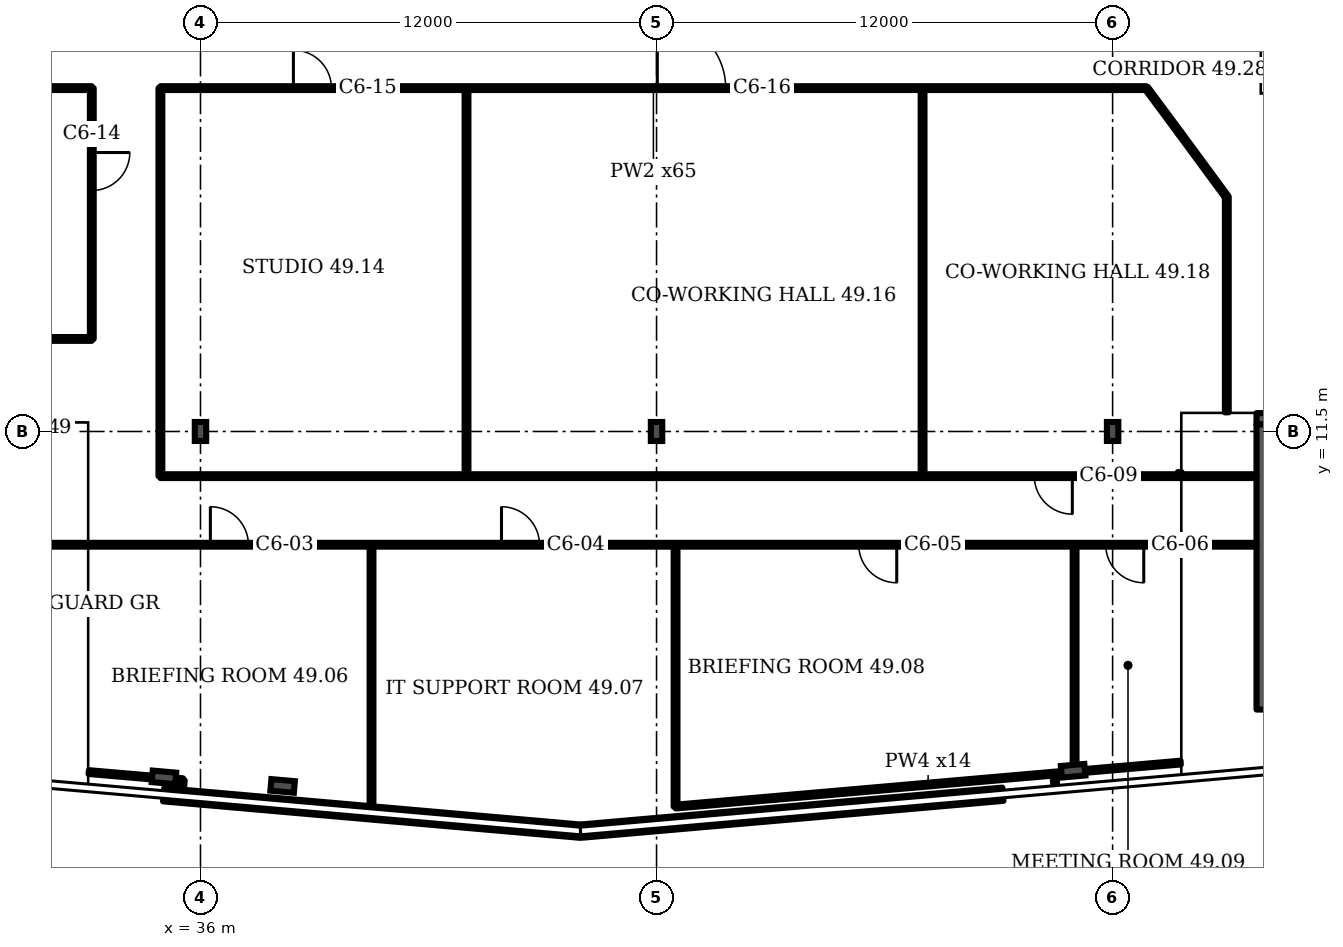
"""IFC4 building model, lengths in metres.
Left out: names, types, materials, properties, quantities, classifications, styles, units other than length and angle.
Written with IfcOpenShell. Run it as: python <this file> out.ifc"""

import sys

from ifc_helpers import new_model, si_unit, direction, frame, frame_2d, origin, origin_2d, place, context, subcontext, project, spatial, rectangle, i_section, extrude, element, fill, save


model = new_model("IFC4")
c1 = context("Model", 3, precision=1e-05, world=origin(), true_north=direction((0.0, 1.0)))
c2 = subcontext(c1, "Body", "Model", "MODEL_VIEW")
j1 = project(units=[si_unit("LENGTHUNIT", "METRE"), si_unit("PLANEANGLEUNIT", "RADIAN")], contexts=[c1])
p1 = place(None, origin())
s1 = spatial("IfcSite", under=j1, at=p1, CompositionType="ELEMENT")
p2 = place(p1, origin())
s2 = spatial("IfcBuilding", under=s1, at=p2, CompositionType="ELEMENT")
p3 = place(p2, frame((0.0, 0.0, 198.7)))
s3 = spatial("IfcBuildingStorey", under=s2, at=p3, CompositionType="ELEMENT", Elevation=198.7)
for number, where, z_axis, x_axis in (
    (1, (35.039, 2.399, 0.0), (0.0, 0.0, 1.0), (-0.087, -0.996, 0.0)),
    (2, (38.161, 2.174, 0.0), (0.0, 0.0, 1.0), (-0.087, -0.996, 0.0)),
    (3, (58.961, 2.573, 0.0), (0.0, 0.0, 1.0), (0.087, -0.996, 0.0)),
):
    element("IfcColumn", number, at=place(p3, frame(where, z_axis=z_axis, x_axis=x_axis)), inside=s3, PredefinedType="COLUMN", context=c2, shape_type="SweptSolid", body=[
        extrude(i_section(OverallWidth=0.305, OverallDepth=0.62, WebThickness=0.021, FlangeThickness=0.04, FilletRadius=0.027, at=origin_2d()), origin(), (0.0, 0.0, 1.0), 3.6),
    ])
for number, where, z_axis, x_axis in (
    (4, (36.0, 11.5, 0.0), (0.0, 0.0, 1.0), (1.0, 0.0, 0.0)),
    (5, (48.0, 11.5, 0.0), (0.0, 0.0, 1.0), (1.0, 0.0, 0.0)),
    (6, (60.0, 11.5, 0.0), (0.0, 0.0, 1.0), (1.0, 0.0, 0.0)),
):
    element("IfcColumn", number, at=place(p3, frame(where, z_axis=z_axis, x_axis=x_axis)), inside=s3, PredefinedType="COLUMN", context=c2, shape_type="SweptSolid", body=[
        extrude(i_section(OverallWidth=0.3, OverallDepth=0.5, WebThickness=0.014, FlangeThickness=0.028, FilletRadius=0.027, at=origin_2d()), origin(), (0.0, 0.0, 1.0), 3.6),
    ])
p4 = place(p3, frame((35.03, 1.943, 0.0), z_axis=(0.0, 0.0, 1.0), x_axis=(0.996199, -0.08714, 0.0)))
e7 = element("IfcWall", 7, at=p4, inside=s3, PredefinedType="SOLIDWALL", context=c2, shape_type="SweptSolid", body=[
    extrude(rectangle(XDim=11.028, YDim=0.35, at=frame_2d((5.514, 0.0))), origin(), (0.0, 0.0, 1.0), 1.0),
])
p5 = place(p3, frame((46.045, 0.987, 0.0), z_axis=(0.0, 0.0, 1.0), x_axis=(0.996193, 0.087171, 0.0)))
e8 = element("IfcWall", 8, at=p5, inside=s3, PredefinedType="SOLIDWALL", context=c2, shape_type="SweptSolid", body=[
    extrude(rectangle(XDim=11.11, YDim=0.35, at=frame_2d((5.555, 0.0))), origin(), (0.0, 0.0, 1.0), 1.0),
])
p6 = place(p3, frame((63.786, 11.834, 0.0), z_axis=(0.0, 0.0, 1.0), x_axis=(1.0, 0.0, 0.0)))
e9 = element("IfcWall", 9, at=p6, inside=s3, PredefinedType="SHEAR", context=c2, shape_type="SweptSolid", body=[
    extrude(rectangle(XDim=4.35, YDim=0.3, at=frame_2d((2.175, 0.0))), origin(), (0.0, 0.0, 1.0), 3.15),
])
p7 = place(p6, frame((1.575, 0.0, 0.0)))
e10 = element("IfcOpeningElement", 10, at=p7, cuts=e9, PredefinedType="OPENING", context=c2, shape_type="SweptSolid", body=[
    extrude(rectangle(XDim=1.2, YDim=2.1, at=frame_2d((0.6, 1.05))), frame((0.0, 0.16, 0.0), z_axis=(0.0, -1.0, 0.0), x_axis=(1.0, 0.0, 0.0)), (0.0, 0.0, 1.0), 0.32),
])
p8 = place(p3, frame((18.585, 20.535, 0.0), z_axis=(0.0, 0.0, 1.0), x_axis=(1.0, 0.0, 0.0)))
e11 = element("IfcWall", 11, at=p8, inside=s3, PredefinedType="PARTITIONING", context=c2, shape_type="SweptSolid", body=[
    extrude(rectangle(XDim=14.555, YDim=0.1, at=frame_2d((7.277, 0.0))), origin(), (0.0, 0.0, 1.0), 3.15),
])
p9 = place(p3, frame((30.69, 13.935, 0.0), z_axis=(0.0, 0.0, 1.0), x_axis=(1.0, 0.0, 0.0)))
e12 = element("IfcWall", 12, at=p9, inside=s3, PredefinedType="PARTITIONING", context=c2, shape_type="SweptSolid", body=[
    extrude(rectangle(XDim=2.45, YDim=0.1, at=frame_2d((1.225, 0.0))), origin(), (0.0, 0.0, 1.0), 3.15),
])
p10 = place(p3, frame((31.714, 8.52, 0.0), z_axis=(0.0, 0.0, 1.0), x_axis=(1.0, 0.0, 0.0)))
e13 = element("IfcWall", 13, at=p10, inside=s3, PredefinedType="PARTITIONING", context=c2, shape_type="SweptSolid", body=[
    extrude(rectangle(XDim=32.072, YDim=0.1, at=frame_2d((16.036, 0.0))), origin(), (0.0, 0.0, 1.0), 3.15),
])
p11 = place(p10, frame((4.546, 0.0, 0.0)))
e14 = element("IfcOpeningElement", 14, at=p11, cuts=e13, PredefinedType="OPENING", context=c2, shape_type="SweptSolid", body=[
    extrude(rectangle(XDim=1.0, YDim=2.1, at=frame_2d((0.5, 1.05))), frame((0.0, 0.06, 0.0), z_axis=(0.0, -1.0, 0.0), x_axis=(1.0, 0.0, 0.0)), (0.0, 0.0, 1.0), 0.12),
])
p12 = place(p10, frame((12.206, 0.0, 0.0)))
e15 = element("IfcOpeningElement", 15, at=p12, cuts=e13, PredefinedType="OPENING", context=c2, shape_type="SweptSolid", body=[
    extrude(rectangle(XDim=1.0, YDim=2.1, at=frame_2d((0.5, 1.05))), frame((0.0, 0.06, 0.0), z_axis=(0.0, -1.0, 0.0), x_axis=(1.0, 0.0, 0.0)), (0.0, 0.0, 1.0), 0.12),
])
p13 = place(p10, frame((21.606, 0.0, 0.0)))
e16 = element("IfcOpeningElement", 16, at=p13, cuts=e13, PredefinedType="OPENING", context=c2, shape_type="SweptSolid", body=[
    extrude(rectangle(XDim=1.0, YDim=2.1, at=frame_2d((0.5, 1.05))), frame((0.0, 0.06, 0.0), z_axis=(0.0, -1.0, 0.0), x_axis=(1.0, 0.0, 0.0)), (0.0, 0.0, 1.0), 0.12),
])
p14 = place(p10, frame((28.106, 0.0, 0.0)))
e17 = element("IfcOpeningElement", 17, at=p14, cuts=e13, PredefinedType="OPENING", context=c2, shape_type="SweptSolid", body=[
    extrude(rectangle(XDim=1.0, YDim=2.1, at=frame_2d((0.5, 1.05))), frame((0.0, 0.06, 0.0), z_axis=(0.0, -1.0, 0.0), x_axis=(1.0, 0.0, 0.0)), (0.0, 0.0, 1.0), 0.12),
])
p15 = place(p3, frame((33.14, 13.935, 0.0), z_axis=(0.0, 0.0, 1.0), x_axis=(0.0, 1.0, 0.0)))
e18 = element("IfcWall", 18, at=p15, inside=s3, PredefinedType="PARTITIONING", context=c2, shape_type="SweptSolid", body=[
    extrude(rectangle(XDim=6.6, YDim=0.1, at=frame_2d((3.3, 0.0))), origin(), (0.0, 0.0, 1.0), 3.15),
])
p16 = place(p15, frame((3.905, 0.0, 0.0)))
e19 = element("IfcOpeningElement", 19, at=p16, cuts=e18, PredefinedType="OPENING", context=c2, shape_type="SweptSolid", body=[
    extrude(rectangle(XDim=1.0, YDim=2.1, at=frame_2d((0.5, 1.05))), frame((0.0, 0.06, 0.0), z_axis=(0.0, -1.0, 0.0), x_axis=(1.0, 0.0, 0.0)), (0.0, 0.0, 1.0), 0.12),
])
p17 = place(p3, frame((34.945, 10.325, 0.0), z_axis=(0.0, 0.0, 1.0), x_axis=(0.0, 1.0, 0.0)))
e20 = element("IfcWall", 20, at=p17, inside=s3, PredefinedType="PARTITIONING", context=c2, shape_type="SweptSolid", body=[
    extrude(rectangle(XDim=10.21, YDim=0.1, at=frame_2d((5.105, 0.0))), origin(), (0.0, 0.0, 1.0), 3.15),
])
p18 = place(p3, frame((34.945, 10.325, 0.0), z_axis=(0.0, 0.0, 1.0), x_axis=(1.0, 0.0, 0.0)))
e21 = element("IfcWall", 21, at=p18, inside=s3, PredefinedType="PARTITIONING", context=c2, shape_type="SweptSolid", body=[
    extrude(rectangle(XDim=28.841, YDim=0.1, at=frame_2d((14.421, 0.0))), origin(), (0.0, 0.0, 1.0), 3.15),
])
p19 = place(p18, frame((22.995, 0.0, 0.0)))
e22 = element("IfcOpeningElement", 22, at=p19, cuts=e21, PredefinedType="OPENING", context=c2, shape_type="SweptSolid", body=[
    extrude(rectangle(XDim=1.0, YDim=2.1, at=frame_2d((0.5, 1.05))), frame((0.0, 0.06, 0.0), z_axis=(0.0, -1.0, 0.0), x_axis=(1.0, 0.0, 0.0)), (0.0, 0.0, 1.0), 0.12),
])
p20 = place(p3, frame((34.945, 20.535, 0.0), z_axis=(0.0, 0.0, 1.0), x_axis=(1.0, 0.0, 0.0)))
e23 = element("IfcWall", 23, at=p20, inside=s3, PredefinedType="PARTITIONING", context=c2, shape_type="SweptSolid", body=[
    extrude(rectangle(XDim=25.945, YDim=0.1, at=frame_2d((12.972, 0.0))), origin(), (0.0, 0.0, 1.0), 3.15),
])
p21 = place(p20, frame((3.5, 0.0, 0.0)))
e24 = element("IfcOpeningElement", 24, at=p21, cuts=e23, PredefinedType="OPENING", context=c2, shape_type="SweptSolid", body=[
    extrude(rectangle(XDim=1.0, YDim=2.1, at=frame_2d((0.5, 1.05))), frame((0.0, 0.06, 0.0), z_axis=(0.0, -1.0, 0.0), x_axis=(1.0, 0.0, 0.0)), (0.0, 0.0, 1.0), 0.12),
])
p22 = place(p20, frame((13.075, 0.0, 0.0)))
e25 = element("IfcOpeningElement", 25, at=p22, cuts=e23, PredefinedType="OPENING", context=c2, shape_type="SweptSolid", body=[
    extrude(rectangle(XDim=1.8, YDim=2.1, at=frame_2d((0.9, 1.05))), frame((0.0, 0.06, 0.0), z_axis=(0.0, -1.0, 0.0), x_axis=(1.0, 0.0, 0.0)), (0.0, 0.0, 1.0), 0.12),
])
p23 = place(p3, frame((35.502, 1.927, 0.0), z_axis=(0.0, 0.0, 1.0), x_axis=(0.083045, 0.996542, 0.0)))
e26 = element("IfcWall", 26, at=p23, inside=s3, PredefinedType="PARTITIONING", context=c2, shape_type="SweptSolid", body=[
    extrude(rectangle(XDim=0.4, YDim=0.1, at=frame_2d((0.2, 0.0))), origin(), (0.0, 0.0, 1.0), 3.15),
])
p24 = place(p3, frame((35.535, 2.325, 0.0), z_axis=(0.0, 0.0, 1.0), x_axis=(-0.996311, 0.085867, 0.0)))
e27 = element("IfcWall", 27, at=p24, inside=s3, PredefinedType="PARTITIONING", context=c2, shape_type="SweptSolid", body=[
    extrude(rectangle(XDim=2.485, YDim=0.1, at=frame_2d((1.243, 0.0))), origin(), (0.0, 0.0, 1.0), 2.53),
])
p25 = place(p3, frame((40.5, 1.489, 0.0), z_axis=(0.0, 0.0, 1.0), x_axis=(0.0, 1.0, 0.0)))
e28 = element("IfcWall", 28, at=p25, inside=s3, PredefinedType="PARTITIONING", context=c2, shape_type="SweptSolid", body=[
    extrude(rectangle(XDim=7.031, YDim=0.1, at=frame_2d((3.515, 0.0))), origin(), (0.0, 0.0, 1.0), 3.15),
])
p26 = place(p3, frame((43.0, 10.33, 0.0), z_axis=(0.0, 0.0, 1.0), x_axis=(0.0, 1.0, 0.0)))
e29 = element("IfcWall", 29, at=p26, inside=s3, PredefinedType="PARTITIONING", context=c2, shape_type="SweptSolid", body=[
    extrude(rectangle(XDim=10.205, YDim=0.1, at=frame_2d((5.103, 0.0))), origin(), (0.0, 0.0, 1.0), 3.15),
])
p27 = place(p3, frame((48.5, 1.63, 0.0), z_axis=(0.0, 0.0, 1.0), x_axis=(0.0, 1.0, 0.0)))
e30 = element("IfcWall", 30, at=p27, inside=s3, PredefinedType="PARTITIONING", context=c2, shape_type="SweptSolid", body=[
    extrude(rectangle(XDim=6.89, YDim=0.1, at=frame_2d((3.445, 0.0))), origin(), (0.0, 0.0, 1.0), 3.15),
])
p28 = place(p3, frame((48.5, 1.63, 0.0), z_axis=(0.0, 0.0, 1.0), x_axis=(0.996225, 0.086828, 0.0)))
e31 = element("IfcWall", 31, at=p28, inside=s3, PredefinedType="PARTITIONING", context=c2, shape_type="SweptSolid", body=[
    extrude(rectangle(XDim=13.342, YDim=0.1, at=frame_2d((6.671, 0.0))), origin(), (0.0, 0.0, 1.0), 2.53),
])
p29 = place(p3, frame((55.0, 10.325, 0.0), z_axis=(0.0, 0.0, 1.0), x_axis=(0.0, 1.0, 0.0)))
e32 = element("IfcWall", 32, at=p29, inside=s3, PredefinedType="PARTITIONING", context=c2, shape_type="SweptSolid", body=[
    extrude(rectangle(XDim=10.21, YDim=0.1, at=frame_2d((5.105, 0.0))), origin(), (0.0, 0.0, 1.0), 3.15),
])
p30 = place(p3, frame((58.498, 2.102, 0.0), z_axis=(0.0, 0.0, 1.0), x_axis=(-0.083045, 0.996542, 0.0)))
e33 = element("IfcWall", 33, at=p30, inside=s3, PredefinedType="PARTITIONING", context=c2, shape_type="SweptSolid", body=[
    extrude(rectangle(XDim=0.4, YDim=0.1, at=frame_2d((0.2, 0.0))), origin(), (0.0, 0.0, 1.0), 3.15),
])
p31 = place(p3, frame((59.0, 2.545, 0.0), z_axis=(0.0, 0.0, 1.0), x_axis=(0.0, 1.0, 0.0)))
e34 = element("IfcWall", 34, at=p31, inside=s3, PredefinedType="PARTITIONING", context=c2, shape_type="SweptSolid", body=[
    extrude(rectangle(XDim=5.975, YDim=0.1, at=frame_2d((2.988, 0.0))), origin(), (0.0, 0.0, 1.0), 3.15),
])
p32 = place(p3, frame((61.765, 10.325, 0.0), z_axis=(0.0, 0.0, 1.0), x_axis=(0.0, 1.0, 0.0)))
e35 = element("IfcWall", 35, at=p32, inside=s3, PredefinedType="PARTITIONING", context=c2, shape_type="SweptSolid", body=[
    extrude(rectangle(XDim=0.105, YDim=0.1, at=frame_2d((0.052, 0.0))), origin(), (0.0, 0.0, 1.0), 3.15),
])
p33 = place(p3, frame((61.765, 19.355, 0.0), z_axis=(0.0, 0.0, 1.0), x_axis=(-0.595656, 0.803238, 0.0)))
e36 = element("IfcWall", 36, at=p33, inside=s3, PredefinedType="PARTITIONING", context=c2, shape_type="SweptSolid", body=[
    extrude(rectangle(XDim=1.469, YDim=0.1, at=frame_2d((0.734, 0.0))), origin(), (0.0, 0.0, 1.0), 3.15),
])
p34 = place(p3, frame((63.005, 17.67, 0.0), z_axis=(0.0, 0.0, 1.0), x_axis=(-0.592694, 0.805429, 0.0)))
e37 = element("IfcWall", 37, at=p34, inside=s3, PredefinedType="PARTITIONING", context=c2, shape_type="SweptSolid", body=[
    extrude(rectangle(XDim=2.092, YDim=0.1, at=frame_2d((1.046, 0.0))), origin(), (0.0, 0.0, 1.0), 3.15),
])
p35 = place(p3, frame((63.005, 12.004, 0.0), z_axis=(0.0, 0.0, 1.0), x_axis=(0.0, 1.0, 0.0)))
e38 = element("IfcWall", 38, at=p35, inside=s3, PredefinedType="PARTITIONING", context=c2, shape_type="SweptSolid", body=[
    extrude(rectangle(XDim=5.666, YDim=0.1, at=frame_2d((2.833, 0.0))), origin(), (0.0, 0.0, 1.0), 3.15),
])
p36 = place(p3, frame((63.936, 4.184, 0.0), z_axis=(0.0, 0.0, 1.0), x_axis=(0.0, 1.0, 0.0)))
e39 = element("IfcWall", 39, at=p36, inside=s3, PredefinedType="SHEAR", context=c2, shape_type="SweptSolid", body=[
    extrude(rectangle(XDim=7.5, YDim=0.3, at=frame_2d((3.75, 0.0))), origin(), (0.0, 0.0, 1.0), 3.15),
])
p37 = place(p11, origin())
e40 = element("IfcDoor", 40, at=p37, inside=s3, OperationType="SINGLE_SWING_LEFT", PredefinedType="DOOR", context=c2, shape_type="SweptSolid", body=[
    extrude(rectangle(XDim=1.0, YDim=2.1, at=frame_2d((0.5, 1.05))), frame((0.0, 0.025, 0.0), z_axis=(0.0, -1.0, 0.0), x_axis=(1.0, 0.0, 0.0)), (0.0, 0.0, 1.0), 0.05),
])
fill(e14, e40)
p38 = place(p12, origin())
e41 = element("IfcDoor", 41, at=p38, inside=s3, OperationType="SINGLE_SWING_LEFT", PredefinedType="DOOR", context=c2, shape_type="SweptSolid", body=[
    extrude(rectangle(XDim=1.0, YDim=2.1, at=frame_2d((0.5, 1.05))), frame((0.0, 0.025, 0.0), z_axis=(0.0, -1.0, 0.0), x_axis=(1.0, 0.0, 0.0)), (0.0, 0.0, 1.0), 0.05),
])
fill(e15, e41)
p39 = place(p13, origin())
e42 = element("IfcDoor", 42, at=p39, inside=s3, OperationType="SINGLE_SWING_RIGHT", PredefinedType="DOOR", context=c2, shape_type="SweptSolid", body=[
    extrude(rectangle(XDim=1.0, YDim=2.1, at=frame_2d((0.5, 1.05))), frame((0.0, 0.025, 0.0), z_axis=(0.0, -1.0, 0.0), x_axis=(1.0, 0.0, 0.0)), (0.0, 0.0, 1.0), 0.05),
])
fill(e16, e42)
p40 = place(p14, origin())
e43 = element("IfcDoor", 43, at=p40, inside=s3, OperationType="SINGLE_SWING_RIGHT", PredefinedType="DOOR", context=c2, shape_type="SweptSolid", body=[
    extrude(rectangle(XDim=1.0, YDim=2.1, at=frame_2d((0.5, 1.05))), frame((0.0, 0.025, 0.0), z_axis=(0.0, -1.0, 0.0), x_axis=(1.0, 0.0, 0.0)), (0.0, 0.0, 1.0), 0.05),
])
fill(e17, e43)
p41 = place(p19, origin())
e44 = element("IfcDoor", 44, at=p41, inside=s3, OperationType="SINGLE_SWING_RIGHT", PredefinedType="DOOR", context=c2, shape_type="SweptSolid", body=[
    extrude(rectangle(XDim=1.0, YDim=2.1, at=frame_2d((0.5, 1.05))), frame((0.0, 0.025, 0.0), z_axis=(0.0, -1.0, 0.0), x_axis=(1.0, 0.0, 0.0)), (0.0, 0.0, 1.0), 0.05),
])
fill(e22, e44)
p42 = place(p16, origin())
e45 = element("IfcDoor", 45, at=p42, inside=s3, OperationType="SINGLE_SWING_RIGHT", PredefinedType="DOOR", context=c2, shape_type="SweptSolid", body=[
    extrude(rectangle(XDim=1.0, YDim=2.1, at=frame_2d((0.5, 1.05))), frame((0.0, 0.025, 0.0), z_axis=(0.0, -1.0, 0.0), x_axis=(1.0, 0.0, 0.0)), (0.0, 0.0, 1.0), 0.05),
])
fill(e19, e45)
p43 = place(p21, origin())
e46 = element("IfcDoor", 46, at=p43, inside=s3, OperationType="SINGLE_SWING_LEFT", PredefinedType="DOOR", context=c2, shape_type="SweptSolid", body=[
    extrude(rectangle(XDim=1.0, YDim=2.1, at=frame_2d((0.5, 1.05))), frame((0.0, 0.025, 0.0), z_axis=(0.0, -1.0, 0.0), x_axis=(1.0, 0.0, 0.0)), (0.0, 0.0, 1.0), 0.05),
])
fill(e24, e46)
p44 = place(p22, origin())
e47 = element("IfcDoor", 47, at=p44, inside=s3, OperationType="DOUBLE_DOOR_SINGLE_SWING", PredefinedType="DOOR", context=c2, shape_type="SweptSolid", body=[
    extrude(rectangle(XDim=1.8, YDim=2.1, at=frame_2d((0.9, 1.05))), frame((0.0, 0.025, 0.0), z_axis=(0.0, -1.0, 0.0), x_axis=(1.0, 0.0, 0.0)), (0.0, 0.0, 1.0), 0.05),
])
fill(e25, e47)
save(model, sys.argv[1])
